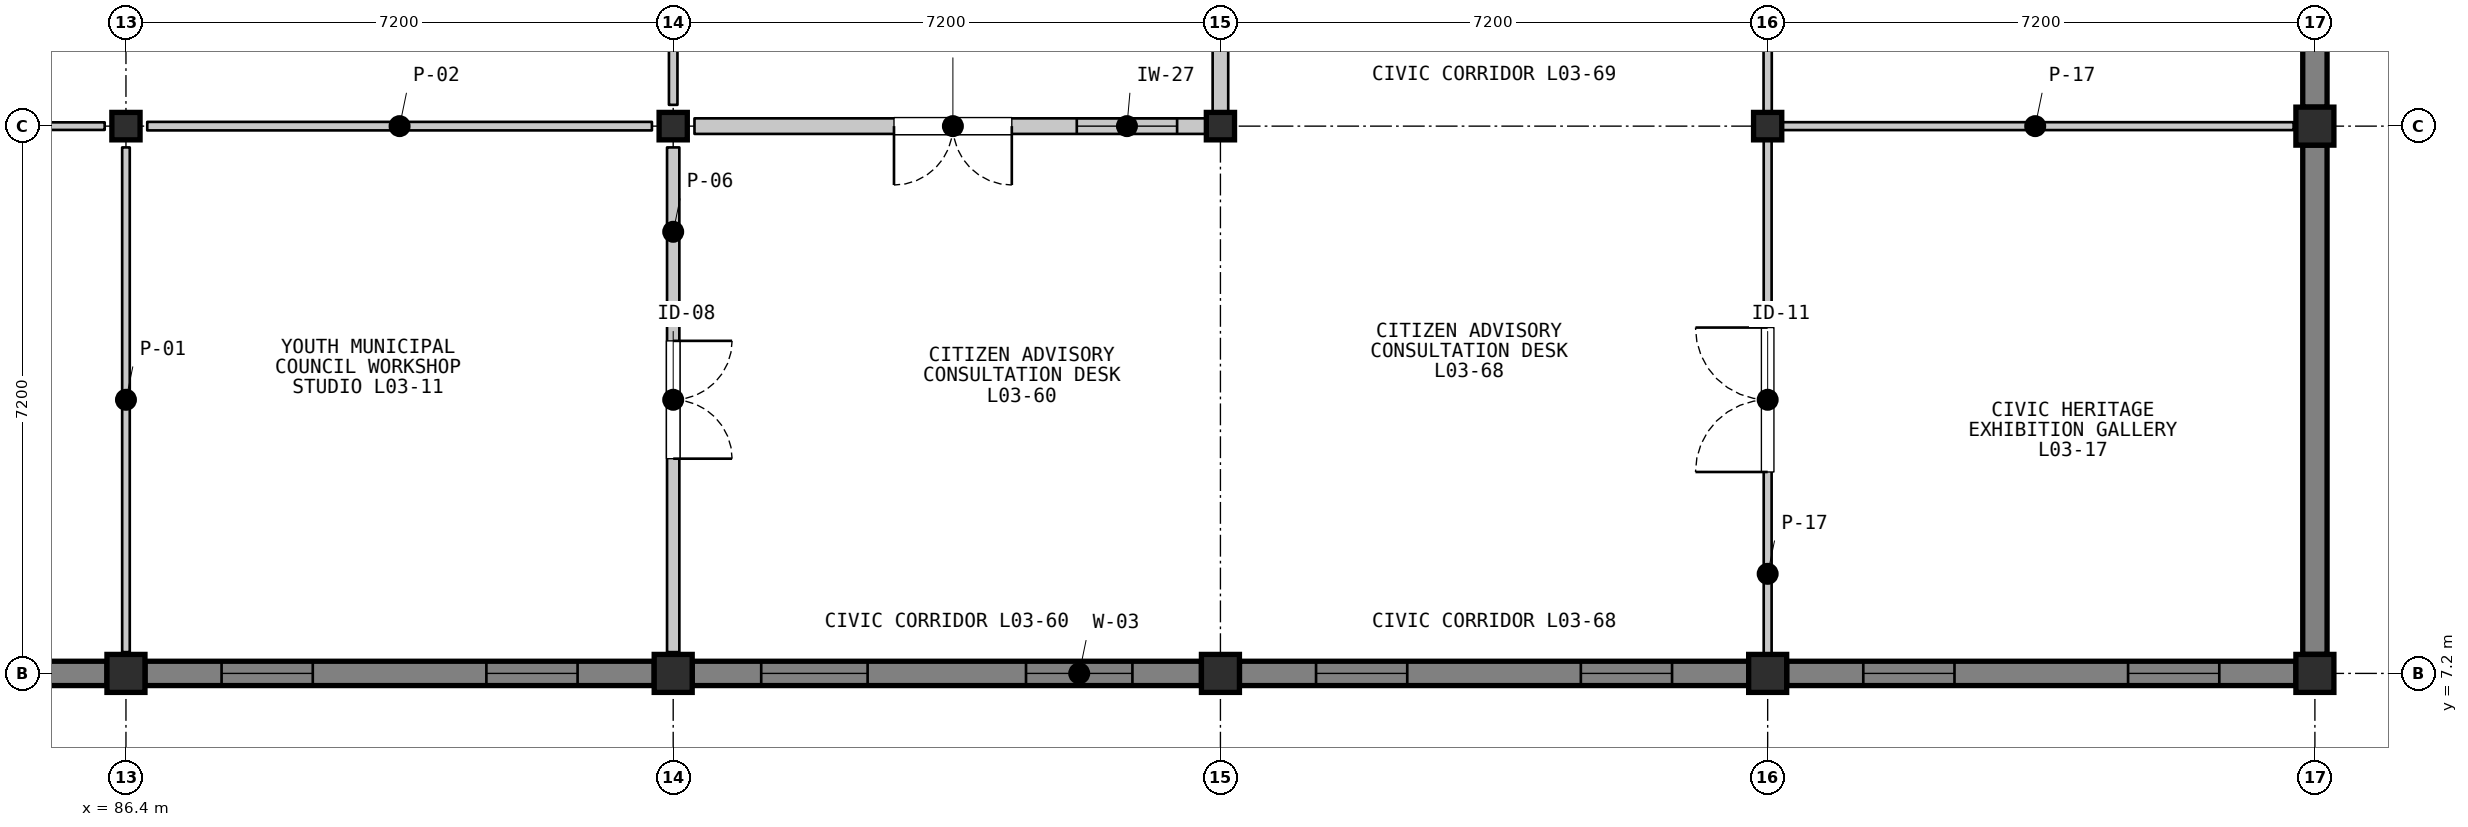
"""IFC4 building model, lengths in metres.
Left out: names, types, materials, properties, quantities, classifications, styles, units other than length and angle.
Written with IfcOpenShell. Run it as: python <this file> out.ifc"""

import sys

from ifc_helpers import new_model, si_unit, direction, frame, frame_2d, origin, origin_2d, place, context, subcontext, project, spatial, rectangle, i_section, extrude, element, fill, save


model = new_model("IFC4")
c1 = context("Model", 3, precision=1e-05, world=origin(), true_north=direction((0.0, 1.0)))
c2 = subcontext(c1, "Body", "Model", "MODEL_VIEW")
j1 = project(units=[si_unit("LENGTHUNIT", "METRE"), si_unit("PLANEANGLEUNIT", "RADIAN")], contexts=[c1])
p1 = place(None, origin())
s1 = spatial("IfcSite", under=j1, at=p1, CompositionType="ELEMENT")
p2 = place(p1, origin())
s2 = spatial("IfcBuilding", under=s1, at=p2, CompositionType="ELEMENT")
p3 = place(p2, frame((0.0, 0.0, 9.9)))
s3 = spatial("IfcBuildingStorey", under=s2, at=p3, CompositionType="ELEMENT", Elevation=9.9)
p4 = place(p3, frame((86.4, 7.2, 0.0), z_axis=(0.0, 0.0, 1.0), x_axis=(1.0, 0.0, 0.0)))
e1 = element("IfcColumn", 1, at=p4, inside=s3, PredefinedType="COLUMN", context=c2, shape_type="SweptSolid", body=[
    extrude(rectangle(XDim=0.5, YDim=0.5, at=origin_2d()), origin(), (0.0, 0.0, 1.0), 4.2),
])
p5 = place(p3, frame((86.4, 14.4, 0.0), z_axis=(0.0, 0.0, 1.0), x_axis=(1.0, 0.0, 0.0)))
e2 = element("IfcColumn", 2, at=p5, inside=s3, PredefinedType="COLUMN", context=c2, shape_type="SweptSolid", body=[
    extrude(i_section(OverallWidth=0.371, OverallDepth=0.361, WebThickness=0.012, FlangeThickness=0.02, FilletRadius=0.015, at=origin_2d()), origin(), (0.0, 0.0, 1.0), 4.2),
])
p6 = place(p3, frame((93.6, 7.2, 0.0), z_axis=(0.0, 0.0, 1.0), x_axis=(1.0, 0.0, 0.0)))
e3 = element("IfcColumn", 3, at=p6, inside=s3, PredefinedType="COLUMN", context=c2, shape_type="SweptSolid", body=[
    extrude(rectangle(XDim=0.5, YDim=0.5, at=origin_2d()), origin(), (0.0, 0.0, 1.0), 4.2),
])
p7 = place(p3, frame((93.6, 14.4, 0.0), z_axis=(0.0, 0.0, 1.0), x_axis=(1.0, 0.0, 0.0)))
e4 = element("IfcColumn", 4, at=p7, inside=s3, PredefinedType="COLUMN", context=c2, shape_type="SweptSolid", body=[
    extrude(i_section(OverallWidth=0.371, OverallDepth=0.361, WebThickness=0.012, FlangeThickness=0.02, FilletRadius=0.015, at=origin_2d()), origin(), (0.0, 0.0, 1.0), 4.2),
])
p8 = place(p3, frame((100.8, 7.2, 0.0), z_axis=(0.0, 0.0, 1.0), x_axis=(1.0, 0.0, 0.0)))
e5 = element("IfcColumn", 5, at=p8, inside=s3, PredefinedType="COLUMN", context=c2, shape_type="SweptSolid", body=[
    extrude(rectangle(XDim=0.5, YDim=0.5, at=origin_2d()), origin(), (0.0, 0.0, 1.0), 4.2),
])
p9 = place(p3, frame((100.8, 14.4, 0.0), z_axis=(0.0, 0.0, 1.0), x_axis=(1.0, 0.0, 0.0)))
e6 = element("IfcColumn", 6, at=p9, inside=s3, PredefinedType="COLUMN", context=c2, shape_type="SweptSolid", body=[
    extrude(i_section(OverallWidth=0.371, OverallDepth=0.361, WebThickness=0.012, FlangeThickness=0.02, FilletRadius=0.015, at=origin_2d()), origin(), (0.0, 0.0, 1.0), 4.2),
])
p10 = place(p3, frame((108.0, 7.2, 0.0), z_axis=(0.0, 0.0, 1.0), x_axis=(1.0, 0.0, 0.0)))
e7 = element("IfcColumn", 7, at=p10, inside=s3, PredefinedType="COLUMN", context=c2, shape_type="SweptSolid", body=[
    extrude(rectangle(XDim=0.5, YDim=0.5, at=origin_2d()), origin(), (0.0, 0.0, 1.0), 4.2),
])
p11 = place(p3, frame((108.0, 14.4, 0.0), z_axis=(0.0, 0.0, 1.0), x_axis=(1.0, 0.0, 0.0)))
e8 = element("IfcColumn", 8, at=p11, inside=s3, PredefinedType="COLUMN", context=c2, shape_type="SweptSolid", body=[
    extrude(i_section(OverallWidth=0.371, OverallDepth=0.361, WebThickness=0.012, FlangeThickness=0.02, FilletRadius=0.015, at=origin_2d()), origin(), (0.0, 0.0, 1.0), 4.2),
])
for number, where, z_axis, x_axis in (
    (9, (115.2, 7.2, 0.0), (0.0, 0.0, 1.0), (1.0, 0.0, 0.0)),
    (10, (115.2, 14.4, 0.0), (0.0, 0.0, 1.0), (1.0, 0.0, 0.0)),
):
    element("IfcColumn", number, at=place(p3, frame(where, z_axis=z_axis, x_axis=x_axis)), inside=s3, PredefinedType="COLUMN", context=c2, shape_type="SweptSolid", body=[
        extrude(rectangle(XDim=0.5, YDim=0.5, at=origin_2d()), origin(), (0.0, 0.0, 1.0), 4.2),
    ])
p12 = place(p3, frame((86.15, 7.2, 0.0), z_axis=(0.0, 0.0, 1.0), x_axis=(-1.0, 0.0, 0.0)))
e11 = element("IfcWall", 11, at=p12, inside=s3, PredefinedType="SOLIDWALL", context=c2, shape_type="SweptSolid", body=[
    extrude(rectangle(XDim=6.7, YDim=0.32, at=frame_2d((3.35, 0.0))), origin(), (0.0, 0.0, 1.0), 3.418),
])
p13 = place(p12, frame((1.008, 0.0, 0.95)))
e12 = element("IfcOpeningElement", 12, at=p13, cuts=e11, PredefinedType="OPENING", context=c2, shape_type="SweptSolid", body=[
    extrude(rectangle(XDim=1.2, YDim=1.7, at=frame_2d((0.6, 0.85))), frame((0.0, 0.17, 0.0), z_axis=(0.0, -1.0, 0.0), x_axis=(1.0, 0.0, 0.0)), (0.0, 0.0, 1.0), 0.34),
])
p14 = place(p12, frame((4.492, 0.0, 0.95)))
e13 = element("IfcOpeningElement", 13, at=p14, cuts=e11, PredefinedType="OPENING", context=c2, shape_type="SweptSolid", body=[
    extrude(rectangle(XDim=1.2, YDim=1.7, at=frame_2d((0.6, 0.85))), frame((0.0, 0.17, 0.0), z_axis=(0.0, -1.0, 0.0), x_axis=(1.0, 0.0, 0.0)), (0.0, 0.0, 1.0), 0.34),
])
p15 = place(p3, frame((93.35, 7.2, 0.0), z_axis=(0.0, 0.0, 1.0), x_axis=(-1.0, 0.0, 0.0)))
e14 = element("IfcWall", 14, at=p15, inside=s3, PredefinedType="SOLIDWALL", context=c2, shape_type="SweptSolid", body=[
    extrude(rectangle(XDim=6.7, YDim=0.32, at=frame_2d((3.35, 0.0))), origin(), (0.0, 0.0, 1.0), 3.418),
])
p16 = place(p15, frame((1.008, 0.0, 0.95)))
e15 = element("IfcOpeningElement", 15, at=p16, cuts=e14, PredefinedType="OPENING", context=c2, shape_type="SweptSolid", body=[
    extrude(rectangle(XDim=1.2, YDim=1.7, at=frame_2d((0.6, 0.85))), frame((0.0, 0.17, 0.0), z_axis=(0.0, -1.0, 0.0), x_axis=(1.0, 0.0, 0.0)), (0.0, 0.0, 1.0), 0.34),
])
p17 = place(p15, frame((4.492, 0.0, 0.95)))
e16 = element("IfcOpeningElement", 16, at=p17, cuts=e14, PredefinedType="OPENING", context=c2, shape_type="SweptSolid", body=[
    extrude(rectangle(XDim=1.2, YDim=1.7, at=frame_2d((0.6, 0.85))), frame((0.0, 0.17, 0.0), z_axis=(0.0, -1.0, 0.0), x_axis=(1.0, 0.0, 0.0)), (0.0, 0.0, 1.0), 0.34),
])
p18 = place(p3, frame((100.55, 7.2, 0.0), z_axis=(0.0, 0.0, 1.0), x_axis=(-1.0, 0.0, 0.0)))
e17 = element("IfcWall", 17, at=p18, inside=s3, PredefinedType="SOLIDWALL", context=c2, shape_type="SweptSolid", body=[
    extrude(rectangle(XDim=6.7, YDim=0.32, at=frame_2d((3.35, 0.0))), origin(), (0.0, 0.0, 1.0), 3.418),
])
p19 = place(p18, frame((0.908, 0.0, 0.95)))
e18 = element("IfcOpeningElement", 18, at=p19, cuts=e17, PredefinedType="OPENING", context=c2, shape_type="SweptSolid", body=[
    extrude(rectangle(XDim=1.4, YDim=2.1, at=frame_2d((0.7, 1.05))), frame((0.0, 0.17, 0.0), z_axis=(0.0, -1.0, 0.0), x_axis=(1.0, 0.0, 0.0)), (0.0, 0.0, 1.0), 0.34),
])
p20 = place(p18, frame((4.392, 0.0, 0.95)))
e19 = element("IfcOpeningElement", 19, at=p20, cuts=e17, PredefinedType="OPENING", context=c2, shape_type="SweptSolid", body=[
    extrude(rectangle(XDim=1.4, YDim=2.1, at=frame_2d((0.7, 1.05))), frame((0.0, 0.17, 0.0), z_axis=(0.0, -1.0, 0.0), x_axis=(1.0, 0.0, 0.0)), (0.0, 0.0, 1.0), 0.34),
])
p21 = place(p3, frame((107.75, 7.2, 0.0), z_axis=(0.0, 0.0, 1.0), x_axis=(-1.0, 0.0, 0.0)))
e20 = element("IfcWall", 20, at=p21, inside=s3, PredefinedType="SOLIDWALL", context=c2, shape_type="SweptSolid", body=[
    extrude(rectangle(XDim=6.7, YDim=0.32, at=frame_2d((3.35, 0.0))), origin(), (0.0, 0.0, 1.0), 3.418),
])
p22 = place(p21, frame((1.008, 0.0, 0.95)))
e21 = element("IfcOpeningElement", 21, at=p22, cuts=e20, PredefinedType="OPENING", context=c2, shape_type="SweptSolid", body=[
    extrude(rectangle(XDim=1.2, YDim=1.7, at=frame_2d((0.6, 0.85))), frame((0.0, 0.17, 0.0), z_axis=(0.0, -1.0, 0.0), x_axis=(1.0, 0.0, 0.0)), (0.0, 0.0, 1.0), 0.34),
])
p23 = place(p21, frame((4.492, 0.0, 0.95)))
e22 = element("IfcOpeningElement", 22, at=p23, cuts=e20, PredefinedType="OPENING", context=c2, shape_type="SweptSolid", body=[
    extrude(rectangle(XDim=1.2, YDim=1.7, at=frame_2d((0.6, 0.85))), frame((0.0, 0.17, 0.0), z_axis=(0.0, -1.0, 0.0), x_axis=(1.0, 0.0, 0.0)), (0.0, 0.0, 1.0), 0.34),
])
p24 = place(p3, frame((114.95, 7.2, 0.0), z_axis=(0.0, 0.0, 1.0), x_axis=(-1.0, 0.0, 0.0)))
e23 = element("IfcWall", 23, at=p24, inside=s3, PredefinedType="SOLIDWALL", context=c2, shape_type="SweptSolid", body=[
    extrude(rectangle(XDim=6.7, YDim=0.32, at=frame_2d((3.35, 0.0))), origin(), (0.0, 0.0, 1.0), 3.418),
])
p25 = place(p24, frame((1.008, 0.0, 0.95)))
e24 = element("IfcOpeningElement", 24, at=p25, cuts=e23, PredefinedType="OPENING", context=c2, shape_type="SweptSolid", body=[
    extrude(rectangle(XDim=1.2, YDim=1.7, at=frame_2d((0.6, 0.85))), frame((0.0, 0.17, 0.0), z_axis=(0.0, -1.0, 0.0), x_axis=(1.0, 0.0, 0.0)), (0.0, 0.0, 1.0), 0.34),
])
p26 = place(p24, frame((4.492, 0.0, 0.95)))
e25 = element("IfcOpeningElement", 25, at=p26, cuts=e23, PredefinedType="OPENING", context=c2, shape_type="SweptSolid", body=[
    extrude(rectangle(XDim=1.2, YDim=1.7, at=frame_2d((0.6, 0.85))), frame((0.0, 0.17, 0.0), z_axis=(0.0, -1.0, 0.0), x_axis=(1.0, 0.0, 0.0)), (0.0, 0.0, 1.0), 0.34),
])
p27 = place(p3, frame((115.2, 14.15, 0.0), z_axis=(0.0, 0.0, 1.0), x_axis=(0.0, -1.0, 0.0)))
e26 = element("IfcWall", 26, at=p27, inside=s3, PredefinedType="SOLIDWALL", context=c2, shape_type="SweptSolid", body=[
    extrude(rectangle(XDim=6.7, YDim=0.32, at=frame_2d((3.35, 0.0))), origin(), (0.0, 0.0, 1.0), 3.487),
])
p28 = place(p3, frame((115.2, 21.35, 0.0), z_axis=(0.0, 0.0, 1.0), x_axis=(0.0, -1.0, 0.0)))
e27 = element("IfcWall", 27, at=p28, inside=s3, PredefinedType="SOLIDWALL", context=c2, shape_type="SweptSolid", body=[
    extrude(rectangle(XDim=6.7, YDim=0.32, at=frame_2d((3.35, 0.0))), origin(), (0.0, 0.0, 1.0), 3.487),
])
p29 = place(p3, frame((79.48, 14.4, 0.0), z_axis=(0.0, 0.0, 1.0), x_axis=(1.0, 0.0, 0.0)))
e28 = element("IfcWall", 28, at=p29, inside=s3, PredefinedType="PARTITIONING", context=c2, shape_type="SweptSolid", body=[
    extrude(rectangle(XDim=6.64, YDim=0.1, at=frame_2d((3.32, 0.0))), origin(), (0.0, 0.0, 1.0), 3.408),
])
p30 = place(p3, frame((86.4, 14.12, 0.0), z_axis=(0.0, 0.0, 1.0), x_axis=(0.0, -1.0, 0.0)))
e29 = element("IfcWall", 29, at=p30, inside=s3, PredefinedType="PARTITIONING", context=c2, shape_type="SweptSolid", body=[
    extrude(rectangle(XDim=6.64, YDim=0.1, at=frame_2d((3.32, 0.0))), origin(), (0.0, 0.0, 1.0), 3.477),
])
p31 = place(p3, frame((93.32, 14.4, 0.0), z_axis=(0.0, 0.0, 1.0), x_axis=(-1.0, 0.0, 0.0)))
e30 = element("IfcWall", 30, at=p31, inside=s3, PredefinedType="PARTITIONING", context=c2, shape_type="SweptSolid", body=[
    extrude(rectangle(XDim=6.64, YDim=0.112, at=frame_2d((3.32, 0.0))), origin(), (0.0, 0.0, 1.0), 3.408),
])
p32 = place(p3, frame((93.6, 21.32, 0.0), z_axis=(0.0, 0.0, 1.0), x_axis=(0.0, -1.0, 0.0)))
e31 = element("IfcWall", 31, at=p32, inside=s3, PredefinedType="PARTITIONING", context=c2, shape_type="SweptSolid", body=[
    extrude(rectangle(XDim=6.64, YDim=0.112, at=frame_2d((3.32, 0.0))), origin(), (0.0, 0.0, 1.0), 3.477),
])
p33 = place(p3, frame((93.6, 14.12, 0.0), z_axis=(0.0, 0.0, 1.0), x_axis=(0.0, -1.0, 0.0)))
e32 = element("IfcWall", 32, at=p33, inside=s3, PredefinedType="PARTITIONING", context=c2, shape_type="SweptSolid", body=[
    extrude(rectangle(XDim=6.64, YDim=0.162, at=frame_2d((3.32, 0.0))), origin(), (0.0, 0.0, 1.0), 3.477),
])
p34 = place(p33, frame((2.545, 0.0, 0.0)))
e33 = element("IfcOpeningElement", 33, at=p34, cuts=e32, PredefinedType="OPENING", context=c2, shape_type="SweptSolid", body=[
    extrude(rectangle(XDim=1.55, YDim=2.3, at=frame_2d((0.775, 1.15))), frame((0.0, 0.091, 0.0), z_axis=(0.0, -1.0, 0.0), x_axis=(1.0, 0.0, 0.0)), (0.0, 0.0, 1.0), 0.182),
])
p35 = place(p3, frame((100.68, 14.4, 0.0), z_axis=(0.0, 0.0, 1.0), x_axis=(-1.0, 0.0, 0.0)))
e34 = element("IfcWall", 34, at=p35, inside=s3, PredefinedType="PARTITIONING", context=c2, shape_type="SweptSolid", body=[
    extrude(rectangle(XDim=6.8, YDim=0.205, at=frame_2d((3.4, 0.0))), origin(), (0.0, 0.0, 1.0), 3.408),
])
p36 = place(p35, frame((2.625, 0.0, 0.0)))
e35 = element("IfcOpeningElement", 35, at=p36, cuts=e34, PredefinedType="OPENING", context=c2, shape_type="SweptSolid", body=[
    extrude(rectangle(XDim=1.55, YDim=2.3, at=frame_2d((0.775, 1.15))), frame((0.0, 0.113, 0.0), z_axis=(0.0, -1.0, 0.0), x_axis=(1.0, 0.0, 0.0)), (0.0, 0.0, 1.0), 0.225),
])
p37 = place(p35, frame((0.45, 0.0, 1.05)))
e36 = element("IfcOpeningElement", 36, at=p37, cuts=e34, PredefinedType="OPENING", context=c2, shape_type="SweptSolid", body=[
    extrude(rectangle(XDim=1.32, YDim=0.92, at=frame_2d((0.66, 0.46))), frame((0.0, 0.113, 0.0), z_axis=(0.0, -1.0, 0.0), x_axis=(1.0, 0.0, 0.0)), (0.0, 0.0, 1.0), 0.225),
])
p38 = place(p3, frame((100.8, 21.48, 0.0), z_axis=(0.0, 0.0, 1.0), x_axis=(0.0, -1.0, 0.0)))
e37 = element("IfcWall", 37, at=p38, inside=s3, PredefinedType="PARTITIONING", context=c2, shape_type="SweptSolid", body=[
    extrude(rectangle(XDim=6.96, YDim=0.205, at=frame_2d((3.48, 0.0))), origin(), (0.0, 0.0, 1.0), 3.408),
])
p39 = place(p3, frame((108.0, 7.32, 0.0), z_axis=(0.0, 0.0, 1.0), x_axis=(0.0, 1.0, 0.0)))
e38 = element("IfcWall", 38, at=p39, inside=s3, PredefinedType="PARTITIONING", context=c2, shape_type="SweptSolid", body=[
    extrude(rectangle(XDim=6.96, YDim=0.104, at=frame_2d((3.48, 0.0))), origin(), (0.0, 0.0, 1.0), 3.408),
])
p40 = place(p39, frame((2.53, 0.0, 0.0)))
e39 = element("IfcOpeningElement", 39, at=p40, cuts=e38, PredefinedType="OPENING", context=c2, shape_type="SweptSolid", body=[
    extrude(rectangle(XDim=1.9, YDim=2.45, at=frame_2d((0.95, 1.225))), frame((0.0, 0.062, 0.0), z_axis=(0.0, -1.0, 0.0), x_axis=(1.0, 0.0, 0.0)), (0.0, 0.0, 1.0), 0.124),
])
p41 = place(p3, frame((108.12, 14.4, 0.0), z_axis=(0.0, 0.0, 1.0), x_axis=(1.0, 0.0, 0.0)))
e40 = element("IfcWall", 40, at=p41, inside=s3, PredefinedType="PARTITIONING", context=c2, shape_type="SweptSolid", body=[
    extrude(rectangle(XDim=6.8, YDim=0.104, at=frame_2d((3.4, 0.0))), origin(), (0.0, 0.0, 1.0), 3.408),
])
p42 = place(p3, frame((108.0, 14.52, 0.0), z_axis=(0.0, 0.0, 1.0), x_axis=(0.0, 1.0, 0.0)))
e41 = element("IfcWall", 41, at=p42, inside=s3, PredefinedType="PARTITIONING", context=c2, shape_type="SweptSolid", body=[
    extrude(rectangle(XDim=6.96, YDim=0.108, at=frame_2d((3.48, 0.0))), origin(), (0.0, 0.0, 1.0), 3.408),
])
p43 = place(p16, origin())
e42 = element("IfcWindow", 42, at=p43, inside=s3, PartitioningType="SINGLE_PANEL", PredefinedType="WINDOW", context=c2, shape_type="SweptSolid", body=[
    extrude(rectangle(XDim=1.2, YDim=1.7, at=frame_2d((0.6, 0.85))), frame((0.0, 0.03, 0.0), z_axis=(0.0, -1.0, 0.0), x_axis=(1.0, 0.0, 0.0)), (0.0, 0.0, 1.0), 0.06),
])
fill(e15, e42)
p44 = place(p17, origin())
e43 = element("IfcWindow", 43, at=p44, inside=s3, PartitioningType="SINGLE_PANEL", PredefinedType="WINDOW", context=c2, shape_type="SweptSolid", body=[
    extrude(rectangle(XDim=1.2, YDim=1.7, at=frame_2d((0.6, 0.85))), frame((0.0, 0.03, 0.0), z_axis=(0.0, -1.0, 0.0), x_axis=(1.0, 0.0, 0.0)), (0.0, 0.0, 1.0), 0.06),
])
fill(e16, e43)
p45 = place(p19, origin())
e44 = element("IfcWindow", 44, at=p45, inside=s3, PartitioningType="SINGLE_PANEL", PredefinedType="WINDOW", context=c2, shape_type="SweptSolid", body=[
    extrude(rectangle(XDim=1.4, YDim=2.1, at=frame_2d((0.7, 1.05))), frame((0.0, 0.03, 0.0), z_axis=(0.0, -1.0, 0.0), x_axis=(1.0, 0.0, 0.0)), (0.0, 0.0, 1.0), 0.06),
])
fill(e18, e44)
p46 = place(p20, origin())
e45 = element("IfcWindow", 45, at=p46, inside=s3, PartitioningType="SINGLE_PANEL", PredefinedType="WINDOW", context=c2, shape_type="SweptSolid", body=[
    extrude(rectangle(XDim=1.4, YDim=2.1, at=frame_2d((0.7, 1.05))), frame((0.0, 0.03, 0.0), z_axis=(0.0, -1.0, 0.0), x_axis=(1.0, 0.0, 0.0)), (0.0, 0.0, 1.0), 0.06),
])
fill(e19, e45)
p47 = place(p22, origin())
e46 = element("IfcWindow", 46, at=p47, inside=s3, PartitioningType="SINGLE_PANEL", PredefinedType="WINDOW", context=c2, shape_type="SweptSolid", body=[
    extrude(rectangle(XDim=1.2, YDim=1.7, at=frame_2d((0.6, 0.85))), frame((0.0, 0.03, 0.0), z_axis=(0.0, -1.0, 0.0), x_axis=(1.0, 0.0, 0.0)), (0.0, 0.0, 1.0), 0.06),
])
fill(e21, e46)
p48 = place(p23, origin())
e47 = element("IfcWindow", 47, at=p48, inside=s3, PartitioningType="SINGLE_PANEL", PredefinedType="WINDOW", context=c2, shape_type="SweptSolid", body=[
    extrude(rectangle(XDim=1.2, YDim=1.7, at=frame_2d((0.6, 0.85))), frame((0.0, 0.03, 0.0), z_axis=(0.0, -1.0, 0.0), x_axis=(1.0, 0.0, 0.0)), (0.0, 0.0, 1.0), 0.06),
])
fill(e22, e47)
p49 = place(p25, origin())
e48 = element("IfcWindow", 48, at=p49, inside=s3, PartitioningType="SINGLE_PANEL", PredefinedType="WINDOW", context=c2, shape_type="SweptSolid", body=[
    extrude(rectangle(XDim=1.2, YDim=1.7, at=frame_2d((0.6, 0.85))), frame((0.0, 0.03, 0.0), z_axis=(0.0, -1.0, 0.0), x_axis=(1.0, 0.0, 0.0)), (0.0, 0.0, 1.0), 0.06),
])
fill(e24, e48)
p50 = place(p26, origin())
e49 = element("IfcWindow", 49, at=p50, inside=s3, PartitioningType="SINGLE_PANEL", PredefinedType="WINDOW", context=c2, shape_type="SweptSolid", body=[
    extrude(rectangle(XDim=1.2, YDim=1.7, at=frame_2d((0.6, 0.85))), frame((0.0, 0.03, 0.0), z_axis=(0.0, -1.0, 0.0), x_axis=(1.0, 0.0, 0.0)), (0.0, 0.0, 1.0), 0.06),
])
fill(e25, e49)
p51 = place(p34, origin())
e50 = element("IfcDoor", 50, at=p51, inside=s3, OperationType="DOUBLE_DOOR_SINGLE_SWING", PredefinedType="DOOR", context=c2, shape_type="SweptSolid", body=[
    extrude(rectangle(XDim=1.55, YDim=2.3, at=frame_2d((0.775, 1.15))), frame((0.0, 0.025, 0.0), z_axis=(0.0, -1.0, 0.0), x_axis=(1.0, 0.0, 0.0)), (0.0, 0.0, 1.0), 0.05),
])
fill(e33, e50)
p52 = place(p36, origin())
e51 = element("IfcDoor", 51, at=p52, inside=s3, OperationType="DOUBLE_DOOR_SINGLE_SWING", PredefinedType="DOOR", context=c2, shape_type="SweptSolid", body=[
    extrude(rectangle(XDim=1.55, YDim=2.3, at=frame_2d((0.775, 1.15))), frame((0.0, 0.025, 0.0), z_axis=(0.0, -1.0, 0.0), x_axis=(1.0, 0.0, 0.0)), (0.0, 0.0, 1.0), 0.05),
])
fill(e35, e51)
p53 = place(p37, origin())
e52 = element("IfcWindow", 52, at=p53, inside=s3, PartitioningType="SINGLE_PANEL", PredefinedType="WINDOW", context=c2, shape_type="SweptSolid", body=[
    extrude(rectangle(XDim=1.32, YDim=0.92, at=frame_2d((0.66, 0.46))), frame((0.0, 0.03, 0.0), z_axis=(0.0, -1.0, 0.0), x_axis=(1.0, 0.0, 0.0)), (0.0, 0.0, 1.0), 0.06),
])
fill(e36, e52)
p54 = place(p40, origin())
e53 = element("IfcDoor", 53, at=p54, inside=s3, OperationType="DOUBLE_DOOR_SINGLE_SWING", PredefinedType="DOOR", context=c2, shape_type="SweptSolid", body=[
    extrude(rectangle(XDim=1.9, YDim=2.45, at=frame_2d((0.95, 1.225))), frame((0.0, 0.025, 0.0), z_axis=(0.0, -1.0, 0.0), x_axis=(1.0, 0.0, 0.0)), (0.0, 0.0, 1.0), 0.05),
])
fill(e39, e53)
save(model, sys.argv[1])
